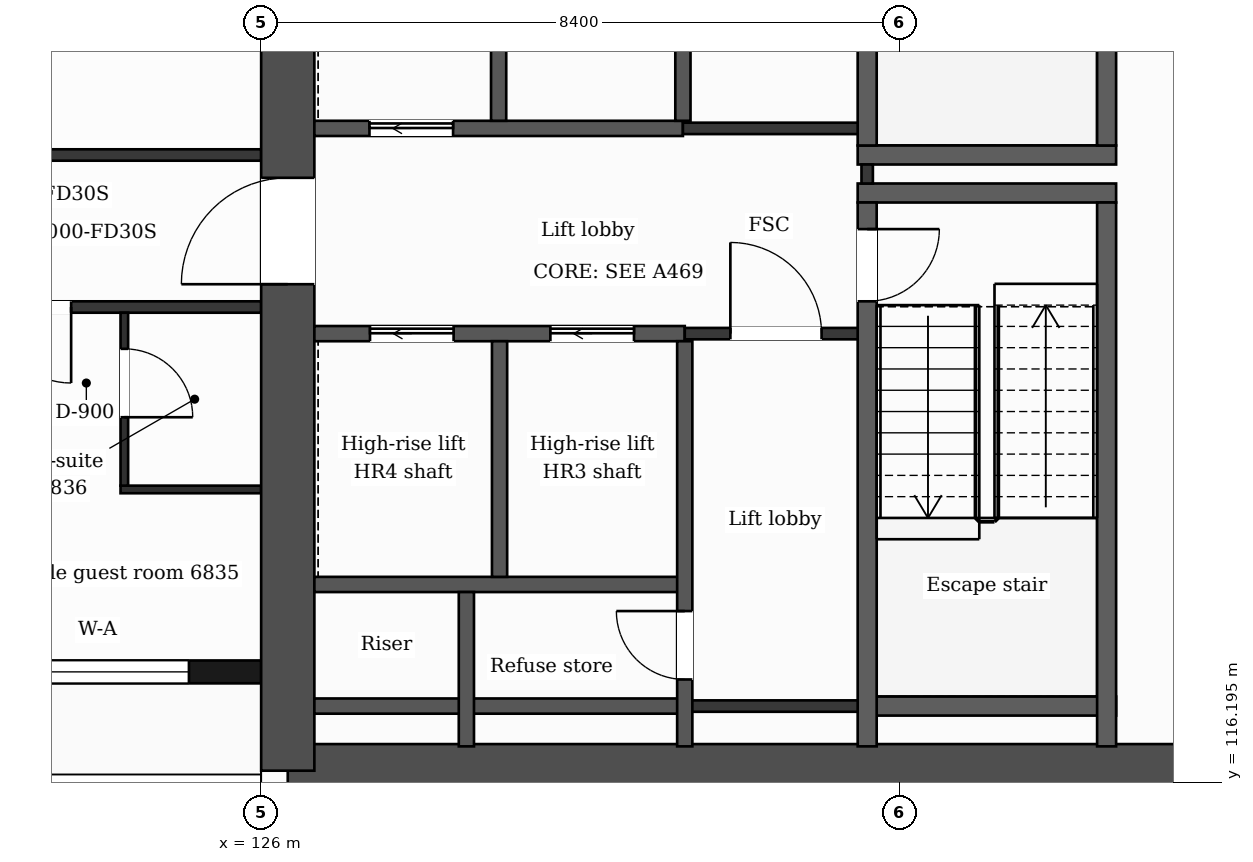
"""IFC4 building model, lengths in metres.
Left out: names, types, materials, properties, quantities, classifications, styles, units other than length and angle.
Written with IfcOpenShell. Run it as: python <this file> out.ifc"""

import sys

from ifc_helpers import new_model, si_unit, direction, frame, frame_2d, origin, place, context, subcontext, project, spatial, rectangle, extrude, element, fill, save


model = new_model("IFC4")
c1 = context("Model", 3, precision=1e-05, world=origin(), true_north=direction((0.0, 1.0)))
c2 = subcontext(c1, "Body", "Model", "MODEL_VIEW")
j1 = project(units=[si_unit("LENGTHUNIT", "METRE"), si_unit("PLANEANGLEUNIT", "RADIAN")], contexts=[c1])
p1 = place(None, origin())
s1 = spatial("IfcSite", under=j1, at=p1, CompositionType="ELEMENT")
p2 = place(p1, origin())
s2 = spatial("IfcBuilding", under=s1, at=p2, CompositionType="ELEMENT")
p3 = place(p2, frame((0.0, 0.0, 281.2)))
s3 = spatial("IfcBuildingStorey", under=s2, at=p3, CompositionType="ELEMENT", Elevation=281.2)
p4 = place(p3, frame((137.863, 132.05, 0.0), z_axis=(0.0, 0.0, 1.0), x_axis=(0.133401241494, -0.991062111458, 0.0)))
e1 = element("IfcWall", 1, at=p4, inside=s3, PredefinedType="SHEAR", context=c2, shape_type="SweptSolid", body=[
    extrude(rectangle(XDim=15.842, YDim=0.7, at=frame_2d((7.921, 0.0))), origin(), (0.0, 0.0, 1.0), 3.7),
])
p5 = place(p3, frame((139.977, 116.35, 0.0), z_axis=(0.0, 0.0, 1.0), x_axis=(-1.0, 0.0, 0.0)))
e2 = element("IfcWall", 2, at=p5, inside=s3, PredefinedType="SHEAR", context=c2, shape_type="SweptSolid", body=[
    extrude(rectangle(XDim=13.626, YDim=0.7, at=frame_2d((6.813, 0.0))), origin(), (0.0, 0.0, 1.0), 3.7),
])
p6 = place(p3, frame((126.35, 116.35, 0.0), z_axis=(0.0, 0.0, 1.0), x_axis=(0.0, 1.0, 0.0)))
e3 = element("IfcWall", 3, at=p6, inside=s3, PredefinedType="SHEAR", context=c2, shape_type="SweptSolid", body=[
    extrude(rectangle(XDim=15.7, YDim=0.7, at=frame_2d((7.85, 0.0))), origin(), (0.0, 0.0, 1.0), 3.7),
])
p7 = place(p6, frame((6.4, 0.0, 0.0)))
e4 = element("IfcOpeningElement", 4, at=p7, cuts=e3, PredefinedType="OPENING", context=c2, shape_type="SweptSolid", body=[
    extrude(rectangle(XDim=1.4, YDim=2.1, at=frame_2d((0.7, 1.05))), frame((0.0, 0.36, 0.0), z_axis=(0.0, -1.0, 0.0), x_axis=(1.0, 0.0, 0.0)), (0.0, 0.0, 1.0), 0.72),
])
p8 = place(p3, frame((117.45, 117.65, 0.0), z_axis=(0.0, 0.0, 1.0), x_axis=(1.0, 0.0, 0.0)))
e5 = element("IfcWall", 5, at=p8, inside=s3, PredefinedType="SOLIDWALL", context=c2, shape_type="SweptSolid", body=[
    extrude(rectangle(XDim=8.55, YDim=0.3, at=frame_2d((4.275, 0.0))), origin(), (0.0, 0.0, 1.0), 3.38),
])
p9 = place(p8, frame((0.75, 0.0, 0.0)))
e6 = element("IfcOpeningElement", 6, at=p9, cuts=e5, PredefinedType="OPENING", context=c2, shape_type="SweptSolid", body=[
    extrude(rectangle(XDim=1.2, YDim=2.4, at=frame_2d((0.6, 1.2))), frame((0.0, 0.16, 0.0), z_axis=(0.0, -1.0, 0.0), x_axis=(1.0, 0.0, 0.0)), (0.0, 0.0, 1.0), 0.32),
])
p10 = place(p8, frame((2.55, 0.0, 0.9)))
e7 = element("IfcOpeningElement", 7, at=p10, cuts=e5, PredefinedType="OPENING", context=c2, shape_type="SweptSolid", body=[
    extrude(rectangle(XDim=1.2, YDim=2.1, at=frame_2d((0.6, 1.05))), frame((0.0, 0.16, 0.0), z_axis=(0.0, -1.0, 0.0), x_axis=(1.0, 0.0, 0.0)), (0.0, 0.0, 1.0), 0.32),
])
p11 = place(p8, frame((5.2, 0.0, 0.9)))
e8 = element("IfcOpeningElement", 8, at=p11, cuts=e5, PredefinedType="OPENING", context=c2, shape_type="SweptSolid", body=[
    extrude(rectangle(XDim=2.4, YDim=2.1, at=frame_2d((1.2, 1.05))), frame((0.0, 0.16, 0.0), z_axis=(0.0, -1.0, 0.0), x_axis=(1.0, 0.0, 0.0)), (0.0, 0.0, 1.0), 0.32),
])
p12 = place(p3, frame((126.7, 117.2, 0.0), z_axis=(0.0, 0.0, 1.0), x_axis=(1.0, 0.0, 0.0)))
e9 = element("IfcWall", 9, at=p12, inside=s3, PredefinedType="PARTITIONING", context=c2, shape_type="SweptSolid", body=[
    extrude(rectangle(XDim=4.873, YDim=0.2, at=frame_2d((2.437, 0.0))), origin(), (0.0, 0.0, 1.0), 3.38),
])
p13 = place(p3, frame((131.573, 117.2, 0.0), z_axis=(0.0, 0.0, 1.0), x_axis=(1.0, 0.0, 0.0)))
e10 = element("IfcWall", 10, at=p13, inside=s3, PredefinedType="PARTITIONING", context=c2, shape_type="SweptSolid", body=[
    extrude(rectangle(XDim=2.4, YDim=0.15, at=frame_2d((1.2, 0.0))), origin(), (0.0, 0.0, 1.0), 3.38),
])
p14 = place(p3, frame((133.973, 117.2, 0.0), z_axis=(0.0, 0.0, 1.0), x_axis=(1.0, 0.0, 0.0)))
e11 = element("IfcWall", 11, at=p14, inside=s3, PredefinedType="PARTITIONING", context=c2, shape_type="SweptSolid", body=[
    extrude(rectangle(XDim=3.275, YDim=0.25, at=frame_2d((1.638, 0.0))), origin(), (0.0, 0.0, 1.0), 3.38),
])
p15 = place(p3, frame((126.7, 118.8, 0.0), z_axis=(0.0, 0.0, 1.0), x_axis=(1.0, 0.0, 0.0)))
e12 = element("IfcWall", 12, at=p15, inside=s3, PredefinedType="PARTITIONING", context=c2, shape_type="SweptSolid", body=[
    extrude(rectangle(XDim=4.873, YDim=0.2, at=frame_2d((2.437, 0.0))), origin(), (0.0, 0.0, 1.0), 3.38),
])
p16 = place(p3, frame((124.15, 120.05, 0.0), z_axis=(0.0, 0.0, 1.0), x_axis=(1.0, 0.0, 0.0)))
e13 = element("IfcWall", 13, at=p16, inside=s3, PredefinedType="PARTITIONING", context=c2, shape_type="SweptSolid", body=[
    extrude(rectangle(XDim=1.85, YDim=0.1, at=frame_2d((0.925, 0.0))), origin(), (0.0, 0.0, 1.0), 3.38),
])
p17 = place(p3, frame((126.7, 122.1, 0.0), z_axis=(0.0, 0.0, 1.0), x_axis=(1.0, 0.0, 0.0)))
e14 = element("IfcWall", 14, at=p17, inside=s3, PredefinedType="PARTITIONING", context=c2, shape_type="SweptSolid", body=[
    extrude(rectangle(XDim=4.873, YDim=0.2, at=frame_2d((2.437, 0.0))), origin(), (0.0, 0.0, 1.0), 3.38),
])
p18 = place(p17, frame((3.105, 0.0, 0.0)))
e15 = element("IfcOpeningElement", 15, at=p18, cuts=e14, PredefinedType="OPENING", context=c2, shape_type="SweptSolid", body=[
    extrude(rectangle(XDim=1.1, YDim=2.1, at=frame_2d((0.55, 1.05))), frame((0.0, 0.11, 0.0), z_axis=(0.0, -1.0, 0.0), x_axis=(1.0, 0.0, 0.0)), (0.0, 0.0, 1.0), 0.22),
])
p19 = place(p17, frame((0.732, 0.0, 0.0)))
e16 = element("IfcOpeningElement", 16, at=p19, cuts=e14, PredefinedType="OPENING", context=c2, shape_type="SweptSolid", body=[
    extrude(rectangle(XDim=1.1, YDim=2.1, at=frame_2d((0.55, 1.05))), frame((0.0, 0.11, 0.0), z_axis=(0.0, -1.0, 0.0), x_axis=(1.0, 0.0, 0.0)), (0.0, 0.0, 1.0), 0.22),
])
p20 = place(p3, frame((131.573, 122.1, 0.0), z_axis=(0.0, 0.0, 1.0), x_axis=(1.0, 0.0, 0.0)))
e17 = element("IfcWall", 17, at=p20, inside=s3, PredefinedType="PARTITIONING", context=c2, shape_type="SweptSolid", body=[
    extrude(rectangle(XDim=2.4, YDim=0.15, at=frame_2d((1.2, 0.0))), origin(), (0.0, 0.0, 1.0), 3.38),
])
p21 = place(p20, frame((0.6, 0.0, 0.0)))
e18 = element("IfcOpeningElement", 18, at=p21, cuts=e17, PredefinedType="OPENING", context=c2, shape_type="SweptSolid", body=[
    extrude(rectangle(XDim=1.2, YDim=2.1, at=frame_2d((0.6, 1.05))), frame((0.0, 0.085, 0.0), z_axis=(0.0, -1.0, 0.0), x_axis=(1.0, 0.0, 0.0)), (0.0, 0.0, 1.0), 0.17),
])
p22 = place(p3, frame((100.8, 122.45, 0.0), z_axis=(0.0, 0.0, 1.0), x_axis=(1.0, 0.0, 0.0)))
e19 = element("IfcWall", 19, at=p22, inside=s3, PredefinedType="PARTITIONING", context=c2, shape_type="SweptSolid", body=[
    extrude(rectangle(XDim=25.2, YDim=0.15, at=frame_2d((12.6, 0.0))), origin(), (0.0, 0.0, 1.0), 3.38),
])
p23 = place(p22, frame((0.55, 0.0, 0.0)))
e20 = element("IfcOpeningElement", 20, at=p23, cuts=e19, PredefinedType="OPENING", context=c2, shape_type="SweptSolid", body=[
    extrude(rectangle(XDim=1.0, YDim=2.1, at=frame_2d((0.5, 1.05))), frame((0.0, 0.085, 0.0), z_axis=(0.0, -1.0, 0.0), x_axis=(1.0, 0.0, 0.0)), (0.0, 0.0, 1.0), 0.17),
])
p24 = place(p22, frame((9.375, 0.0, 0.0)))
e21 = element("IfcOpeningElement", 21, at=p24, cuts=e19, PredefinedType="OPENING", context=c2, shape_type="SweptSolid", body=[
    extrude(rectangle(XDim=1.0, YDim=2.1, at=frame_2d((0.5, 1.05))), frame((0.0, 0.085, 0.0), z_axis=(0.0, -1.0, 0.0), x_axis=(1.0, 0.0, 0.0)), (0.0, 0.0, 1.0), 0.17),
])
p25 = place(p22, frame((13.23, 0.0, 0.0)))
e22 = element("IfcOpeningElement", 22, at=p25, cuts=e19, PredefinedType="OPENING", context=c2, shape_type="SweptSolid", body=[
    extrude(rectangle(XDim=1.0, YDim=2.1, at=frame_2d((0.5, 1.05))), frame((0.0, 0.085, 0.0), z_axis=(0.0, -1.0, 0.0), x_axis=(1.0, 0.0, 0.0)), (0.0, 0.0, 1.0), 0.17),
])
p26 = place(p22, frame((19.513, 0.0, 0.0)))
e23 = element("IfcOpeningElement", 23, at=p26, cuts=e19, PredefinedType="OPENING", context=c2, shape_type="SweptSolid", body=[
    extrude(rectangle(XDim=0.95, YDim=2.1, at=frame_2d((0.475, 1.05))), frame((0.0, 0.085, 0.0), z_axis=(0.0, -1.0, 0.0), x_axis=(1.0, 0.0, 0.0)), (0.0, 0.0, 1.0), 0.17),
])
p27 = place(p22, frame((21.7, 0.0, 0.0)))
e24 = element("IfcOpeningElement", 24, at=p27, cuts=e19, PredefinedType="OPENING", context=c2, shape_type="SweptSolid", body=[
    extrude(rectangle(XDim=1.0, YDim=2.1, at=frame_2d((0.5, 1.05))), frame((0.0, 0.085, 0.0), z_axis=(0.0, -1.0, 0.0), x_axis=(1.0, 0.0, 0.0)), (0.0, 0.0, 1.0), 0.17),
])
for number, where, z_axis, x_axis in (
    (25, (133.848, 123.95, 0.0), (0.0, 0.0, 1.0), (1.0, 0.0, 0.0)),
    (26, (133.848, 124.45, 0.0), (0.0, 0.0, 1.0), (1.0, 0.0, 0.0)),
):
    element("IfcWall", number, at=place(p3, frame(where, z_axis=z_axis, x_axis=x_axis)), inside=s3, PredefinedType="PARTITIONING", context=c2, shape_type="SweptSolid", body=[
        extrude(rectangle(XDim=3.4, YDim=0.25, at=frame_2d((1.7, 0.0))), origin(), (0.0, 0.0, 1.0), 3.38),
    ])
p28 = place(p3, frame((100.8, 124.45, 0.0), z_axis=(0.0, 0.0, 1.0), x_axis=(1.0, 0.0, 0.0)))
e27 = element("IfcWall", 27, at=p28, inside=s3, PredefinedType="PARTITIONING", context=c2, shape_type="SweptSolid", body=[
    extrude(rectangle(XDim=25.2, YDim=0.15, at=frame_2d((12.6, 0.0))), origin(), (0.0, 0.0, 1.0), 3.38),
])
p29 = place(p28, frame((21.075, 0.0, 0.0)))
e28 = element("IfcOpeningElement", 28, at=p29, cuts=e27, PredefinedType="OPENING", context=c2, shape_type="SweptSolid", body=[
    extrude(rectangle(XDim=1.0, YDim=2.1, at=frame_2d((0.5, 1.05))), frame((0.0, 0.085, 0.0), z_axis=(0.0, -1.0, 0.0), x_axis=(1.0, 0.0, 0.0)), (0.0, 0.0, 1.0), 0.17),
])
p30 = place(p28, frame((5.375, 0.0, 0.0)))
e29 = element("IfcOpeningElement", 29, at=p30, cuts=e27, PredefinedType="OPENING", context=c2, shape_type="SweptSolid", body=[
    extrude(rectangle(XDim=1.0, YDim=2.1, at=frame_2d((0.5, 1.05))), frame((0.0, 0.085, 0.0), z_axis=(0.0, -1.0, 0.0), x_axis=(1.0, 0.0, 0.0)), (0.0, 0.0, 1.0), 0.17),
])
p31 = place(p28, frame((12.1, 0.0, 0.0)))
e30 = element("IfcOpeningElement", 30, at=p31, cuts=e27, PredefinedType="OPENING", context=c2, shape_type="SweptSolid", body=[
    extrude(rectangle(XDim=1.0, YDim=2.1, at=frame_2d((0.5, 1.05))), frame((0.0, 0.085, 0.0), z_axis=(0.0, -1.0, 0.0), x_axis=(1.0, 0.0, 0.0)), (0.0, 0.0, 1.0), 0.17),
])
p32 = place(p28, frame((17.93, 0.0, 0.0)))
e31 = element("IfcOpeningElement", 31, at=p32, cuts=e27, PredefinedType="OPENING", context=c2, shape_type="SweptSolid", body=[
    extrude(rectangle(XDim=1.0, YDim=2.1, at=frame_2d((0.5, 1.05))), frame((0.0, 0.085, 0.0), z_axis=(0.0, -1.0, 0.0), x_axis=(1.0, 0.0, 0.0)), (0.0, 0.0, 1.0), 0.17),
])
p33 = place(p3, frame((126.7, 124.8, 0.0), z_axis=(0.0, 0.0, 1.0), x_axis=(1.0, 0.0, 0.0)))
e32 = element("IfcWall", 32, at=p33, inside=s3, PredefinedType="PARTITIONING", context=c2, shape_type="SweptSolid", body=[
    extrude(rectangle(XDim=4.849, YDim=0.2, at=frame_2d((2.424, 0.0))), origin(), (0.0, 0.0, 1.0), 3.38),
])
p34 = place(p33, frame((0.725, 0.0, 0.0)))
e33 = element("IfcOpeningElement", 33, at=p34, cuts=e32, PredefinedType="OPENING", context=c2, shape_type="SweptSolid", body=[
    extrude(rectangle(XDim=1.1, YDim=2.1, at=frame_2d((0.55, 1.05))), frame((0.0, 0.11, 0.0), z_axis=(0.0, -1.0, 0.0), x_axis=(1.0, 0.0, 0.0)), (0.0, 0.0, 1.0), 0.22),
])
p35 = place(p3, frame((131.549, 124.8, 0.0), z_axis=(0.0, 0.0, 1.0), x_axis=(1.0, 0.0, 0.0)))
e34 = element("IfcWall", 34, at=p35, inside=s3, PredefinedType="PARTITIONING", context=c2, shape_type="SweptSolid", body=[
    extrude(rectangle(XDim=2.549, YDim=0.15, at=frame_2d((1.275, 0.0))), origin(), (0.0, 0.0, 1.0), 3.38),
])
p36 = place(p3, frame((124.2, 120.1, 0.0), z_axis=(0.0, 0.0, 1.0), x_axis=(0.0, 1.0, 0.0)))
e35 = element("IfcWall", 35, at=p36, inside=s3, PredefinedType="PARTITIONING", context=c2, shape_type="SweptSolid", body=[
    extrude(rectangle(XDim=2.275, YDim=0.1, at=frame_2d((1.137, 0.0))), origin(), (0.0, 0.0, 1.0), 3.38),
])
p37 = place(p36, frame((0.9, 0.0, 0.0)))
e36 = element("IfcOpeningElement", 36, at=p37, cuts=e35, PredefinedType="OPENING", context=c2, shape_type="SweptSolid", body=[
    extrude(rectangle(XDim=0.9, YDim=2.1, at=frame_2d((0.45, 1.05))), frame((0.0, 0.06, 0.0), z_axis=(0.0, -1.0, 0.0), x_axis=(1.0, 0.0, 0.0)), (0.0, 0.0, 1.0), 0.12),
])
p38 = place(p3, frame((128.7, 116.67, 0.0), z_axis=(0.0, 0.0, 1.0), x_axis=(0.0, 1.0, 0.0)))
e37 = element("IfcWall", 37, at=p38, inside=s3, PredefinedType="PARTITIONING", context=c2, shape_type="SweptSolid", body=[
    extrude(rectangle(XDim=2.03, YDim=0.2, at=frame_2d((1.015, 0.0))), origin(), (0.0, 0.0, 1.0), 3.38),
])
for number, where, z_axis, x_axis in (
    (38, (129.124, 124.9, 0.0), (0.0, 0.0, 1.0), (0.0, 1.0, 0.0)),
    (39, (129.136, 118.9, 0.0), (0.0, 0.0, 1.0), (0.0, 1.0, 0.0)),
    (40, (131.549, 124.9, 0.0), (0.0, 0.0, 1.0), (0.0, 1.0, 0.0)),
):
    element("IfcWall", number, at=place(p3, frame(where, z_axis=z_axis, x_axis=x_axis)), inside=s3, PredefinedType="PARTITIONING", context=c2, shape_type="SweptSolid", body=[
        extrude(rectangle(XDim=3.1, YDim=0.2, at=frame_2d((1.55, 0.0))), origin(), (0.0, 0.0, 1.0), 3.38),
    ])
p39 = place(p3, frame((131.573, 116.67, 0.0), z_axis=(0.0, 0.0, 1.0), x_axis=(0.0, 1.0, 0.0)))
e41 = element("IfcWall", 41, at=p39, inside=s3, PredefinedType="PARTITIONING", context=c2, shape_type="SweptSolid", body=[
    extrude(rectangle(XDim=5.33, YDim=0.2, at=frame_2d((2.665, 0.0))), origin(), (0.0, 0.0, 1.0), 3.38),
])
p40 = place(p39, frame((0.88, 0.0, 0.0)))
e42 = element("IfcOpeningElement", 42, at=p40, cuts=e41, PredefinedType="OPENING", context=c2, shape_type="SweptSolid", body=[
    extrude(rectangle(XDim=0.9, YDim=2.1, at=frame_2d((0.45, 1.05))), frame((0.0, 0.11, 0.0), z_axis=(0.0, -1.0, 0.0), x_axis=(1.0, 0.0, 0.0)), (0.0, 0.0, 1.0), 0.22),
])
p41 = place(p3, frame((133.973, 124.075, 0.0), z_axis=(0.0, 0.0, 1.0), x_axis=(0.0, 1.0, 0.0)))
e43 = element("IfcWall", 43, at=p41, inside=s3, PredefinedType="PARTITIONING", context=c2, shape_type="SweptSolid", body=[
    extrude(rectangle(XDim=0.25, YDim=0.15, at=frame_2d((0.125, 0.0))), origin(), (0.0, 0.0, 1.0), 3.38),
])
p42 = place(p3, frame((133.973, 116.67, 0.0), z_axis=(0.0, 0.0, 1.0), x_axis=(0.0, 1.0, 0.0)))
e44 = element("IfcWall", 44, at=p42, inside=s3, PredefinedType="PARTITIONING", context=c2, shape_type="SweptSolid", body=[
    extrude(rectangle(XDim=7.155, YDim=0.25, at=frame_2d((3.578, 0.0))), origin(), (0.0, 0.0, 1.0), 3.38),
])
p43 = place(p42, frame((5.855, 0.0, 0.0)))
e45 = element("IfcOpeningElement", 45, at=p43, cuts=e44, PredefinedType="OPENING", context=c2, shape_type="SweptSolid", body=[
    extrude(rectangle(XDim=0.95, YDim=2.1, at=frame_2d((0.475, 1.05))), frame((0.0, 0.135, 0.0), z_axis=(0.0, -1.0, 0.0), x_axis=(1.0, 0.0, 0.0)), (0.0, 0.0, 1.0), 0.27),
])
p44 = place(p3, frame((133.973, 124.575, 0.0), z_axis=(0.0, 0.0, 1.0), x_axis=(0.0, 1.0, 0.0)))
e46 = element("IfcWall", 46, at=p44, inside=s3, PredefinedType="PARTITIONING", context=c2, shape_type="SweptSolid", body=[
    extrude(rectangle(XDim=7.155, YDim=0.25, at=frame_2d((3.578, 0.0))), origin(), (0.0, 0.0, 1.0), 3.38),
])
p45 = place(p44, frame((5.325, 0.0, 0.0)))
e47 = element("IfcOpeningElement", 47, at=p45, cuts=e46, PredefinedType="OPENING", context=c2, shape_type="SweptSolid", body=[
    extrude(rectangle(XDim=1.0, YDim=2.1, at=frame_2d((0.5, 1.05))), frame((0.0, 0.135, 0.0), z_axis=(0.0, -1.0, 0.0), x_axis=(1.0, 0.0, 0.0)), (0.0, 0.0, 1.0), 0.27),
])
for number, where, z_axis, x_axis in (
    (48, (137.123, 116.67, 0.0), (0.0, 0.0, 1.0), (0.0, 1.0, 0.0)),
    (49, (137.123, 124.575, 0.0), (0.0, 0.0, 1.0), (0.0, 1.0, 0.0)),
):
    element("IfcWall", number, at=place(p3, frame(where, z_axis=z_axis, x_axis=x_axis)), inside=s3, PredefinedType="PARTITIONING", context=c2, shape_type="SweptSolid", body=[
        extrude(rectangle(XDim=7.155, YDim=0.25, at=frame_2d((3.578, 0.0))), origin(), (0.0, 0.0, 1.0), 3.38),
    ])
p46 = place(p11, origin())
e50 = element("IfcWindow", 50, at=p46, inside=s3, PartitioningType="SINGLE_PANEL", PredefinedType="WINDOW", context=c2, shape_type="SweptSolid", body=[
    extrude(rectangle(XDim=2.4, YDim=2.1, at=frame_2d((1.2, 1.05))), frame((0.0, 0.03, 0.0), z_axis=(0.0, -1.0, 0.0), x_axis=(1.0, 0.0, 0.0)), (0.0, 0.0, 1.0), 0.06),
])
fill(e8, e50)
p47 = place(p21, origin())
e51 = element("IfcDoor", 51, at=p47, inside=s3, OperationType="SINGLE_SWING_LEFT", PredefinedType="DOOR", context=c2, shape_type="SweptSolid", body=[
    extrude(rectangle(XDim=1.2, YDim=2.1, at=frame_2d((0.6, 1.05))), frame((0.0, 0.025, 0.0), z_axis=(0.0, -1.0, 0.0), x_axis=(1.0, 0.0, 0.0)), (0.0, 0.0, 1.0), 0.05),
])
fill(e18, e51)
p48 = place(p18, origin())
e52 = element("IfcDoor", 52, at=p48, inside=s3, OperationType="SLIDING_TO_LEFT", PredefinedType="DOOR", context=c2, shape_type="SweptSolid", body=[
    extrude(rectangle(XDim=1.1, YDim=2.1, at=frame_2d((0.55, 1.05))), frame((0.0, 0.025, 0.0), z_axis=(0.0, -1.0, 0.0), x_axis=(1.0, 0.0, 0.0)), (0.0, 0.0, 1.0), 0.05),
])
fill(e15, e52)
p49 = place(p19, origin())
e53 = element("IfcDoor", 53, at=p49, inside=s3, OperationType="SLIDING_TO_LEFT", PredefinedType="DOOR", context=c2, shape_type="SweptSolid", body=[
    extrude(rectangle(XDim=1.1, YDim=2.1, at=frame_2d((0.55, 1.05))), frame((0.0, 0.025, 0.0), z_axis=(0.0, -1.0, 0.0), x_axis=(1.0, 0.0, 0.0)), (0.0, 0.0, 1.0), 0.05),
])
fill(e16, e53)
p50 = place(p34, origin())
e54 = element("IfcDoor", 54, at=p50, inside=s3, OperationType="SLIDING_TO_LEFT", PredefinedType="DOOR", context=c2, shape_type="SweptSolid", body=[
    extrude(rectangle(XDim=1.1, YDim=2.1, at=frame_2d((0.55, 1.05))), frame((0.0, 0.025, 0.0), z_axis=(0.0, -1.0, 0.0), x_axis=(1.0, 0.0, 0.0)), (0.0, 0.0, 1.0), 0.05),
])
fill(e33, e54)
p51 = place(p43, origin())
e55 = element("IfcDoor", 55, at=p51, inside=s3, OperationType="SINGLE_SWING_RIGHT", PredefinedType="DOOR", context=c2, shape_type="SweptSolid", body=[
    extrude(rectangle(XDim=0.95, YDim=2.1, at=frame_2d((0.475, 1.05))), frame((0.0, 0.025, 0.0), z_axis=(0.0, -1.0, 0.0), x_axis=(1.0, 0.0, 0.0)), (0.0, 0.0, 1.0), 0.05),
])
fill(e45, e55)
p52 = place(p40, origin())
e56 = element("IfcDoor", 56, at=p52, inside=s3, OperationType="SINGLE_SWING_RIGHT", PredefinedType="DOOR", context=c2, shape_type="SweptSolid", body=[
    extrude(rectangle(XDim=0.9, YDim=2.1, at=frame_2d((0.45, 1.05))), frame((0.0, 0.025, 0.0), z_axis=(0.0, -1.0, 0.0), x_axis=(1.0, 0.0, 0.0)), (0.0, 0.0, 1.0), 0.05),
])
fill(e42, e56)
p53 = place(p27, origin())
e57 = element("IfcDoor", 57, at=p53, inside=s3, OperationType="SINGLE_SWING_RIGHT", PredefinedType="DOOR", context=c2, shape_type="SweptSolid", body=[
    extrude(rectangle(XDim=1.0, YDim=2.1, at=frame_2d((0.5, 1.05))), frame((0.0, 0.025, 0.0), z_axis=(0.0, -1.0, 0.0), x_axis=(1.0, 0.0, 0.0)), (0.0, 0.0, 1.0), 0.05),
])
fill(e24, e57)
p54 = place(p37, origin())
e58 = element("IfcDoor", 58, at=p54, inside=s3, OperationType="SINGLE_SWING_LEFT", PredefinedType="DOOR", context=c2, shape_type="SweptSolid", body=[
    extrude(rectangle(XDim=0.9, YDim=2.1, at=frame_2d((0.45, 1.05))), frame((0.0, 0.025, 0.0), z_axis=(0.0, -1.0, 0.0), x_axis=(1.0, 0.0, 0.0)), (0.0, 0.0, 1.0), 0.05),
])
fill(e36, e58)
p55 = place(p7, origin())
e59 = element("IfcDoor", 59, at=p55, inside=s3, OperationType="SINGLE_SWING_LEFT", PredefinedType="DOOR", context=c2, shape_type="SweptSolid", body=[
    extrude(rectangle(XDim=1.4, YDim=2.1, at=frame_2d((0.7, 1.05))), frame((0.0, 0.025, 0.0), z_axis=(0.0, -1.0, 0.0), x_axis=(1.0, 0.0, 0.0)), (0.0, 0.0, 1.0), 0.05),
])
fill(e4, e59)
save(model, sys.argv[1])
